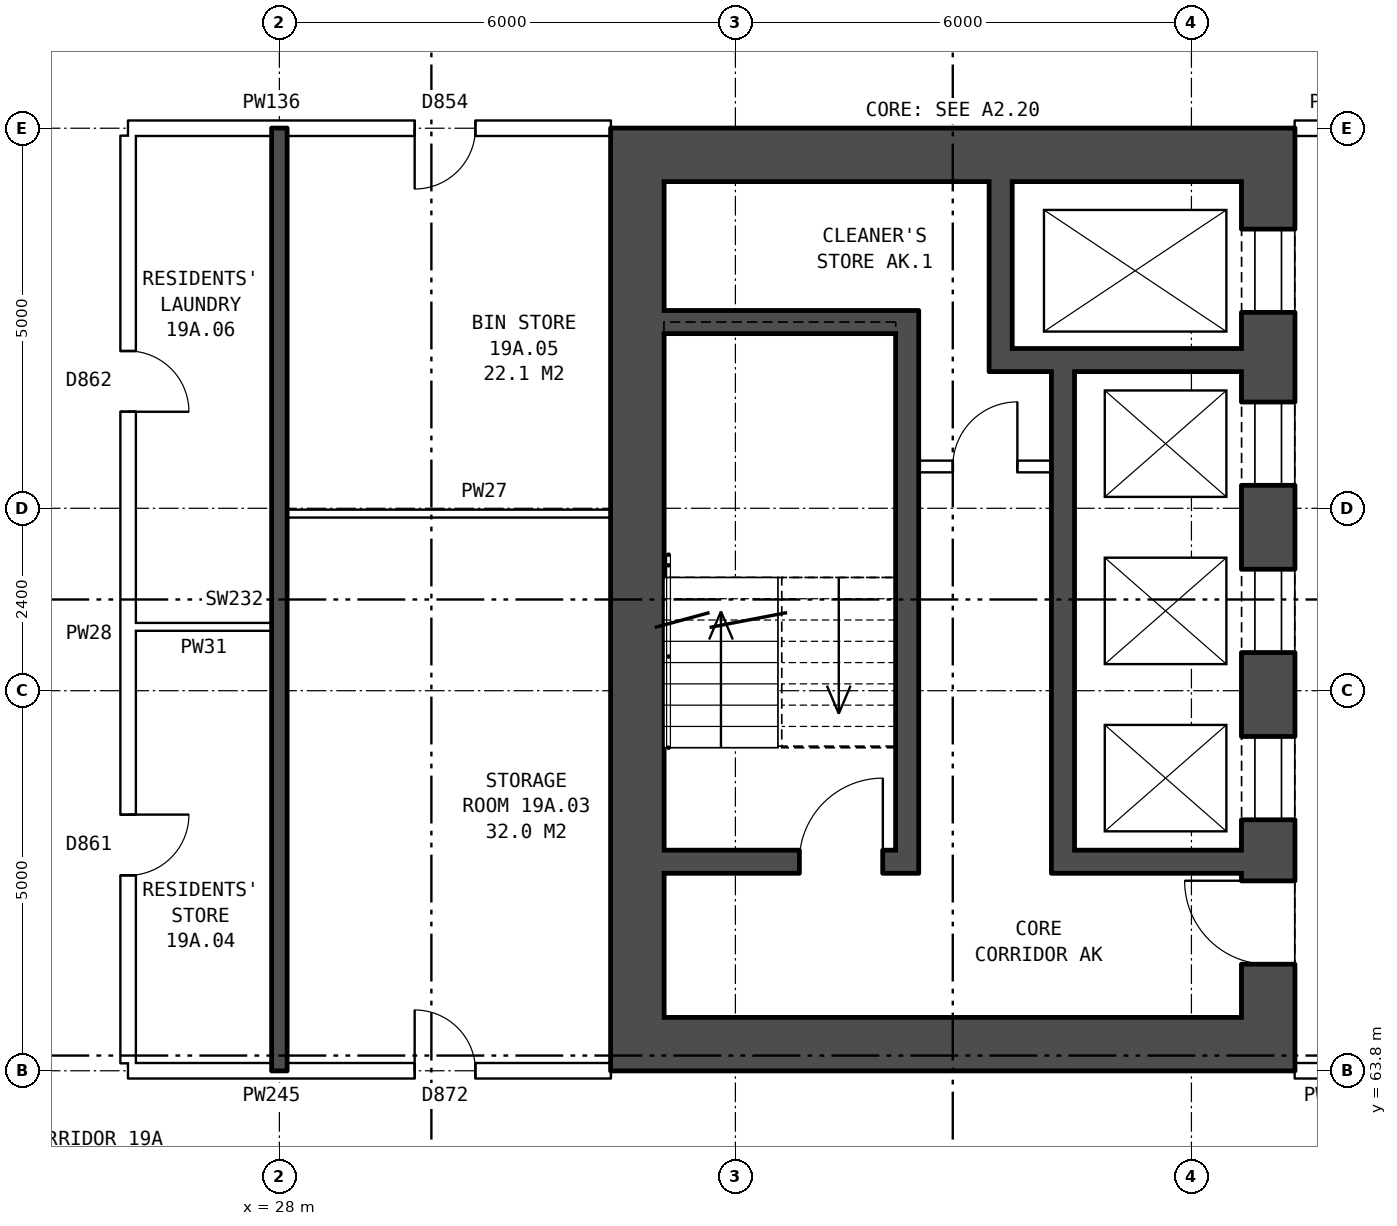
"""IFC4 building model, lengths in metres.
Left out: names, types, materials, properties, quantities, classifications, styles, units other than length and angle.
Written with IfcOpenShell. Run it as: python <this file> out.ifc"""

import sys

from ifc_helpers import new_model, si_unit, direction, frame, frame_2d, origin, place, context, subcontext, project, spatial, rectangle, extrude, element, fill, save


model = new_model("IFC4")
c1 = context("Model", 3, precision=1e-05, world=origin(), true_north=direction((0.0, 1.0)))
c2 = subcontext(c1, "Body", "Model", "MODEL_VIEW")
j1 = project(units=[si_unit("LENGTHUNIT", "METRE"), si_unit("PLANEANGLEUNIT", "RADIAN")], contexts=[c1])
p1 = place(None, origin())
s1 = spatial("IfcSite", under=j1, at=p1, CompositionType="ELEMENT")
p2 = place(p1, origin())
s2 = spatial("IfcBuilding", under=s1, at=p2, CompositionType="ELEMENT")
p3 = place(p2, frame((0.0, 0.0, 71.6)))
s3 = spatial("IfcBuildingStorey", under=s2, at=p3, CompositionType="ELEMENT", Elevation=71.6)
p4 = place(p3, frame((41.01, 75.5, 0.0), z_axis=(0.0, 0.0, 1.0), x_axis=(0.0, -1.0, 0.0)))
e1 = element("IfcWall", 1, at=p4, inside=s3, PredefinedType="SHEAR", context=c2, shape_type="SweptSolid", body=[
    extrude(rectangle(XDim=11.0, YDim=0.7, at=frame_2d((5.5, 0.0))), origin(), (0.0, 0.0, 1.0), 2.85),
])
p5 = place(p4, frame((0.625, 0.0, 0.0)))
e2 = element("IfcOpeningElement", 2, at=p5, cuts=e1, PredefinedType="OPENING", context=c2, shape_type="SweptSolid", body=[
    extrude(rectangle(XDim=1.1, YDim=2.1, at=frame_2d((0.55, 1.05))), frame((0.0, 0.36, 0.0), z_axis=(0.0, -1.0, 0.0), x_axis=(1.0, 0.0, 0.0)), (0.0, 0.0, 1.0), 0.72),
])
p6 = place(p4, frame((2.9, 0.0, 0.0)))
e3 = element("IfcOpeningElement", 3, at=p6, cuts=e1, PredefinedType="OPENING", context=c2, shape_type="SweptSolid", body=[
    extrude(rectangle(XDim=1.1, YDim=2.1, at=frame_2d((0.55, 1.05))), frame((0.0, 0.36, 0.0), z_axis=(0.0, -1.0, 0.0), x_axis=(1.0, 0.0, 0.0)), (0.0, 0.0, 1.0), 0.72),
])
p7 = place(p4, frame((5.1, 0.0, 0.0)))
e4 = element("IfcOpeningElement", 4, at=p7, cuts=e1, PredefinedType="OPENING", context=c2, shape_type="SweptSolid", body=[
    extrude(rectangle(XDim=1.1, YDim=2.1, at=frame_2d((0.55, 1.05))), frame((0.0, 0.36, 0.0), z_axis=(0.0, -1.0, 0.0), x_axis=(1.0, 0.0, 0.0)), (0.0, 0.0, 1.0), 0.72),
])
p8 = place(p4, frame((7.3, 0.0, 0.0)))
e5 = element("IfcOpeningElement", 5, at=p8, cuts=e1, PredefinedType="OPENING", context=c2, shape_type="SweptSolid", body=[
    extrude(rectangle(XDim=1.1, YDim=2.1, at=frame_2d((0.55, 1.05))), frame((0.0, 0.36, 0.0), z_axis=(0.0, -1.0, 0.0), x_axis=(1.0, 0.0, 0.0)), (0.0, 0.0, 1.0), 0.72),
])
p9 = place(p4, frame((9.2, 0.0, 0.0)))
e6 = element("IfcOpeningElement", 6, at=p9, cuts=e1, PredefinedType="OPENING", context=c2, shape_type="SweptSolid", body=[
    extrude(rectangle(XDim=1.1, YDim=2.1, at=frame_2d((0.55, 1.05))), frame((0.0, 0.36, 0.0), z_axis=(0.0, -1.0, 0.0), x_axis=(1.0, 0.0, 0.0)), (0.0, 0.0, 1.0), 0.72),
])
p10 = place(p3, frame((32.71, 75.5, 0.0), z_axis=(0.0, 0.0, 1.0), x_axis=(0.0, -1.0, 0.0)))
e7 = element("IfcWall", 7, at=p10, inside=s3, PredefinedType="SHEAR", context=c2, shape_type="SweptSolid", body=[
    extrude(rectangle(XDim=11.0, YDim=0.7, at=frame_2d((5.5, 0.0))), origin(), (0.0, 0.0, 1.0), 2.85),
])
for number, where, z_axis, x_axis in (
    (8, (41.36, 75.85, 0.0), (0.0, 0.0, 1.0), (-1.0, 0.0, 0.0)),
    (9, (41.36, 64.15, 0.0), (0.0, 0.0, 1.0), (-1.0, 0.0, 0.0)),
):
    element("IfcWall", number, at=place(p3, frame(where, z_axis=z_axis, x_axis=x_axis)), inside=s3, PredefinedType="SHEAR", context=c2, shape_type="SweptSolid", body=[
        extrude(rectangle(XDim=9.0, YDim=0.7, at=frame_2d((4.5, 0.0))), origin(), (0.0, 0.0, 1.0), 2.85),
    ])
p11 = place(p3, frame((36.11, 73.65, 0.0), z_axis=(0.0, 0.0, 1.0), x_axis=(-1.0, 0.0, 0.0)))
e10 = element("IfcWall", 10, at=p11, inside=s3, PredefinedType="SHEAR", context=c2, shape_type="SweptSolid", body=[
    extrude(rectangle(XDim=3.05, YDim=0.3, at=frame_2d((1.525, 0.0))), origin(), (0.0, 0.0, 1.0), 2.85),
])
p12 = place(p3, frame((40.66, 73.15, 0.0), z_axis=(0.0, 0.0, 1.0), x_axis=(-1.0, 0.0, 0.0)))
e11 = element("IfcWall", 11, at=p12, inside=s3, PredefinedType="SHEAR", context=c2, shape_type="SweptSolid", body=[
    extrude(rectangle(XDim=3.32, YDim=0.3, at=frame_2d((1.66, 0.0))), origin(), (0.0, 0.0, 1.0), 2.85),
])
p13 = place(p3, frame((38.16, 71.75, 0.0), z_axis=(0.0, 0.0, 1.0), x_axis=(-1.0, 0.0, 0.0)))
e12 = element("IfcWall", 12, at=p13, inside=s3, PredefinedType="PARTITIONING", context=c2, shape_type="SweptSolid", body=[
    extrude(rectangle(XDim=1.75, YDim=0.15, at=frame_2d((0.875, 0.0))), origin(), (0.0, 0.0, 1.0), 2.85),
])
p14 = place(p13, frame((0.45, 0.0, 0.0)))
e13 = element("IfcOpeningElement", 13, at=p14, cuts=e12, PredefinedType="OPENING", context=c2, shape_type="SweptSolid", body=[
    extrude(rectangle(XDim=0.85, YDim=2.1, at=frame_2d((0.425, 1.05))), frame((0.0, 0.085, 0.0), z_axis=(0.0, -1.0, 0.0), x_axis=(1.0, 0.0, 0.0)), (0.0, 0.0, 1.0), 0.17),
])
p15 = place(p3, frame((40.66, 66.55, 0.0), z_axis=(0.0, 0.0, 1.0), x_axis=(-1.0, 0.0, 0.0)))
e14 = element("IfcWall", 14, at=p15, inside=s3, PredefinedType="SHEAR", context=c2, shape_type="SweptSolid", body=[
    extrude(rectangle(XDim=2.2, YDim=0.3, at=frame_2d((1.1, 0.0))), origin(), (0.0, 0.0, 1.0), 2.85),
])
p16 = place(p3, frame((36.11, 66.55, 0.0), z_axis=(0.0, 0.0, 1.0), x_axis=(-1.0, 0.0, 0.0)))
e15 = element("IfcWall", 15, at=p16, inside=s3, PredefinedType="SHEAR", context=c2, shape_type="SweptSolid", body=[
    extrude(rectangle(XDim=3.05, YDim=0.3, at=frame_2d((1.525, 0.0))), origin(), (0.0, 0.0, 1.0), 2.85),
])
p17 = place(p16, frame((0.17, 0.0, 0.0)))
e16 = element("IfcOpeningElement", 16, at=p17, cuts=e15, PredefinedType="OPENING", context=c2, shape_type="SweptSolid", body=[
    extrude(rectangle(XDim=1.1, YDim=2.1, at=frame_2d((0.55, 1.05))), frame((0.0, 0.16, 0.0), z_axis=(0.0, -1.0, 0.0), x_axis=(1.0, 0.0, 0.0)), (0.0, 0.0, 1.0), 0.32),
])
p18 = place(p3, frame((38.31, 73.0, 0.0), z_axis=(0.0, 0.0, 1.0), x_axis=(0.0, -1.0, 0.0)))
e17 = element("IfcWall", 17, at=p18, inside=s3, PredefinedType="SHEAR", context=c2, shape_type="SweptSolid", body=[
    extrude(rectangle(XDim=6.6, YDim=0.3, at=frame_2d((3.3, 0.0))), origin(), (0.0, 0.0, 1.0), 2.85),
])
p19 = place(p3, frame((37.49, 75.5, 0.0), z_axis=(0.0, 0.0, 1.0), x_axis=(0.0, -1.0, 0.0)))
e18 = element("IfcWall", 18, at=p19, inside=s3, PredefinedType="SHEAR", context=c2, shape_type="SweptSolid", body=[
    extrude(rectangle(XDim=2.2, YDim=0.3, at=frame_2d((1.1, 0.0))), origin(), (0.0, 0.0, 1.0), 2.85),
])
p20 = place(p3, frame((36.26, 73.8, 0.0), z_axis=(0.0, 0.0, 1.0), x_axis=(0.0, -1.0, 0.0)))
e19 = element("IfcWall", 19, at=p20, inside=s3, PredefinedType="SHEAR", context=c2, shape_type="SweptSolid", body=[
    extrude(rectangle(XDim=7.4, YDim=0.3, at=frame_2d((3.7, 0.0))), origin(), (0.0, 0.0, 1.0), 2.85),
])
p21 = place(p3, frame((26.01, 63.8, 0.0), z_axis=(0.0, 0.0, 1.0), x_axis=(1.0, 0.0, 0.0)))
e20 = element("IfcWall", 20, at=p21, inside=s3, PredefinedType="PARTITIONING", context=c2, shape_type="SweptSolid", body=[
    extrude(rectangle(XDim=6.35, YDim=0.2, at=frame_2d((3.175, 0.0))), origin(), (0.0, 0.0, 1.0), 2.85),
])
p22 = place(p21, frame((3.77, 0.0, 0.0)))
e21 = element("IfcOpeningElement", 21, at=p22, cuts=e20, PredefinedType="OPENING", context=c2, shape_type="SweptSolid", body=[
    extrude(rectangle(XDim=0.8, YDim=2.1, at=frame_2d((0.4, 1.05))), frame((0.0, 0.11, 0.0), z_axis=(0.0, -1.0, 0.0), x_axis=(1.0, 0.0, 0.0)), (0.0, 0.0, 1.0), 0.22),
])
p23 = place(p3, frame((41.36, 63.8, 0.0), z_axis=(0.0, 0.0, 1.0), x_axis=(1.0, 0.0, 0.0)))
e22 = element("IfcWall", 22, at=p23, inside=s3, PredefinedType="PARTITIONING", context=c2, shape_type="SweptSolid", body=[
    extrude(rectangle(XDim=3.0, YDim=0.2, at=frame_2d((1.5, 0.0))), origin(), (0.0, 0.0, 1.0), 2.85),
])
p24 = place(p23, frame((1.0, 0.0, 0.0)))
e23 = element("IfcOpeningElement", 23, at=p24, cuts=e22, PredefinedType="OPENING", context=c2, shape_type="SweptSolid", body=[
    extrude(rectangle(XDim=1.0, YDim=2.1, at=frame_2d((0.5, 1.05))), frame((0.0, 0.11, 0.0), z_axis=(0.0, -1.0, 0.0), x_axis=(1.0, 0.0, 0.0)), (0.0, 0.0, 1.0), 0.22),
])
p25 = place(p3, frame((26.11, 69.64, 0.0), z_axis=(0.0, 0.0, 1.0), x_axis=(1.0, 0.0, 0.0)))
e24 = element("IfcWall", 24, at=p25, inside=s3, PredefinedType="PARTITIONING", context=c2, shape_type="SweptSolid", body=[
    extrude(rectangle(XDim=1.79, YDim=0.1, at=frame_2d((0.895, 0.0))), origin(), (0.0, 0.0, 1.0), 2.85),
])
p26 = place(p3, frame((28.1, 71.13, 0.0), z_axis=(0.0, 0.0, 1.0), x_axis=(1.0, 0.0, 0.0)))
e25 = element("IfcWall", 25, at=p26, inside=s3, PredefinedType="PARTITIONING", context=c2, shape_type="SweptSolid", body=[
    extrude(rectangle(XDim=4.26, YDim=0.1, at=frame_2d((2.13, 0.0))), origin(), (0.0, 0.0, 1.0), 2.85),
])
p27 = place(p3, frame((26.01, 76.2, 0.0), z_axis=(0.0, 0.0, 1.0), x_axis=(1.0, 0.0, 0.0)))
e26 = element("IfcWall", 26, at=p27, inside=s3, PredefinedType="PARTITIONING", context=c2, shape_type="SweptSolid", body=[
    extrude(rectangle(XDim=6.35, YDim=0.2, at=frame_2d((3.175, 0.0))), origin(), (0.0, 0.0, 1.0), 2.85),
])
p28 = place(p27, frame((3.77, 0.0, 0.0)))
e27 = element("IfcOpeningElement", 27, at=p28, cuts=e26, PredefinedType="OPENING", context=c2, shape_type="SweptSolid", body=[
    extrude(rectangle(XDim=0.8, YDim=2.1, at=frame_2d((0.4, 1.05))), frame((0.0, 0.11, 0.0), z_axis=(0.0, -1.0, 0.0), x_axis=(1.0, 0.0, 0.0)), (0.0, 0.0, 1.0), 0.22),
])
p29 = place(p3, frame((41.36, 76.2, 0.0), z_axis=(0.0, 0.0, 1.0), x_axis=(1.0, 0.0, 0.0)))
e28 = element("IfcWall", 28, at=p29, inside=s3, PredefinedType="PARTITIONING", context=c2, shape_type="SweptSolid", body=[
    extrude(rectangle(XDim=3.0, YDim=0.2, at=frame_2d((1.5, 0.0))), origin(), (0.0, 0.0, 1.0), 2.85),
])
p30 = place(p29, frame((1.0, 0.0, 0.0)))
e29 = element("IfcOpeningElement", 29, at=p30, cuts=e28, PredefinedType="OPENING", context=c2, shape_type="SweptSolid", body=[
    extrude(rectangle(XDim=1.0, YDim=2.1, at=frame_2d((0.5, 1.05))), frame((0.0, 0.11, 0.0), z_axis=(0.0, -1.0, 0.0), x_axis=(1.0, 0.0, 0.0)), (0.0, 0.0, 1.0), 0.22),
])
p31 = place(p3, frame((26.01, 63.9, 0.0), z_axis=(0.0, 0.0, 1.0), x_axis=(0.0, 1.0, 0.0)))
e30 = element("IfcWall", 30, at=p31, inside=s3, PredefinedType="PARTITIONING", context=c2, shape_type="SweptSolid", body=[
    extrude(rectangle(XDim=12.2, YDim=0.2, at=frame_2d((6.1, 0.0))), origin(), (0.0, 0.0, 1.0), 2.85),
])
p32 = place(p31, frame((2.47, 0.0, 0.0)))
e31 = element("IfcOpeningElement", 31, at=p32, cuts=e30, PredefinedType="OPENING", context=c2, shape_type="SweptSolid", body=[
    extrude(rectangle(XDim=0.8, YDim=2.1, at=frame_2d((0.4, 1.05))), frame((0.0, 0.11, 0.0), z_axis=(0.0, -1.0, 0.0), x_axis=(1.0, 0.0, 0.0)), (0.0, 0.0, 1.0), 0.22),
])
p33 = place(p31, frame((8.57, 0.0, 0.0)))
e32 = element("IfcOpeningElement", 32, at=p33, cuts=e30, PredefinedType="OPENING", context=c2, shape_type="SweptSolid", body=[
    extrude(rectangle(XDim=0.8, YDim=2.1, at=frame_2d((0.4, 1.05))), frame((0.0, 0.11, 0.0), z_axis=(0.0, -1.0, 0.0), x_axis=(1.0, 0.0, 0.0)), (0.0, 0.0, 1.0), 0.22),
])
p34 = place(p3, frame((28.0, 63.8, 0.0), z_axis=(0.0, 0.0, 1.0), x_axis=(0.0, 1.0, 0.0)))
e33 = element("IfcWall", 33, at=p34, inside=s3, PredefinedType="SOLIDWALL", context=c2, shape_type="SweptSolid", body=[
    extrude(rectangle(XDim=12.4, YDim=0.2, at=frame_2d((6.2, 0.0))), origin(), (0.0, 0.0, 1.0), 2.85),
])
p35 = place(p5, origin())
e34 = element("IfcDoor", 34, at=p35, inside=s3, OperationType="DOUBLE_DOOR_SLIDING", PredefinedType="DOOR", context=c2, shape_type="SweptSolid", body=[
    extrude(rectangle(XDim=1.1, YDim=2.1, at=frame_2d((0.55, 1.05))), frame((0.0, -0.285, 0.0), z_axis=(0.0, -1.0, 0.0), x_axis=(1.0, 0.0, 0.0)), (0.0, 0.0, 1.0), 0.05),
])
fill(e2, e34)
p36 = place(p6, origin())
e35 = element("IfcDoor", 35, at=p36, inside=s3, OperationType="DOUBLE_DOOR_SLIDING", PredefinedType="DOOR", context=c2, shape_type="SweptSolid", body=[
    extrude(rectangle(XDim=1.1, YDim=2.1, at=frame_2d((0.55, 1.05))), frame((0.0, -0.285, 0.0), z_axis=(0.0, -1.0, 0.0), x_axis=(1.0, 0.0, 0.0)), (0.0, 0.0, 1.0), 0.05),
])
fill(e3, e35)
p37 = place(p7, origin())
e36 = element("IfcDoor", 36, at=p37, inside=s3, OperationType="DOUBLE_DOOR_SLIDING", PredefinedType="DOOR", context=c2, shape_type="SweptSolid", body=[
    extrude(rectangle(XDim=1.1, YDim=2.1, at=frame_2d((0.55, 1.05))), frame((0.0, -0.285, 0.0), z_axis=(0.0, -1.0, 0.0), x_axis=(1.0, 0.0, 0.0)), (0.0, 0.0, 1.0), 0.05),
])
fill(e4, e36)
p38 = place(p8, origin())
e37 = element("IfcDoor", 37, at=p38, inside=s3, OperationType="DOUBLE_DOOR_SLIDING", PredefinedType="DOOR", context=c2, shape_type="SweptSolid", body=[
    extrude(rectangle(XDim=1.1, YDim=2.1, at=frame_2d((0.55, 1.05))), frame((0.0, -0.285, 0.0), z_axis=(0.0, -1.0, 0.0), x_axis=(1.0, 0.0, 0.0)), (0.0, 0.0, 1.0), 0.05),
])
fill(e5, e37)
p39 = place(p9, frame((1.1, 0.0, 0.0), z_axis=(0.0, 0.0, 1.0), x_axis=(-1.0, 0.0, 0.0)))
e38 = element("IfcDoor", 38, at=p39, inside=s3, OperationType="SINGLE_SWING_RIGHT", PredefinedType="DOOR", context=c2, shape_type="SweptSolid", body=[
    extrude(rectangle(XDim=1.1, YDim=2.1, at=frame_2d((0.55, 1.05))), frame((0.0, 0.335, 0.0), z_axis=(0.0, -1.0, 0.0), x_axis=(1.0, 0.0, 0.0)), (0.0, 0.0, 1.0), 0.05),
])
fill(e6, e38)
p40 = place(p17, frame((1.1, 0.0, 0.0), z_axis=(0.0, 0.0, 1.0), x_axis=(-1.0, 0.0, 0.0)))
e39 = element("IfcDoor", 39, at=p40, inside=s3, OperationType="SINGLE_SWING_RIGHT", PredefinedType="DOOR", context=c2, shape_type="SweptSolid", body=[
    extrude(rectangle(XDim=1.1, YDim=2.1, at=frame_2d((0.55, 1.05))), frame((0.0, 0.025, 0.0), z_axis=(0.0, -1.0, 0.0), x_axis=(1.0, 0.0, 0.0)), (0.0, 0.0, 1.0), 0.05),
])
fill(e16, e39)
p41 = place(p14, frame((0.85, 0.0, 0.0), z_axis=(0.0, 0.0, 1.0), x_axis=(-1.0, 0.0, 0.0)))
e40 = element("IfcDoor", 40, at=p41, inside=s3, OperationType="SINGLE_SWING_RIGHT", PredefinedType="DOOR", context=c2, shape_type="SweptSolid", body=[
    extrude(rectangle(XDim=0.85, YDim=2.1, at=frame_2d((0.425, 1.05))), frame((0.0, 0.025, 0.0), z_axis=(0.0, -1.0, 0.0), x_axis=(1.0, 0.0, 0.0)), (0.0, 0.0, 1.0), 0.05),
])
fill(e13, e40)
p42 = place(p22, origin())
e41 = element("IfcDoor", 41, at=p42, inside=s3, OperationType="SINGLE_SWING_LEFT", PredefinedType="DOOR", context=c2, shape_type="SweptSolid", body=[
    extrude(rectangle(XDim=0.8, YDim=2.1, at=frame_2d((0.4, 1.05))), frame((0.0, 0.025, 0.0), z_axis=(0.0, -1.0, 0.0), x_axis=(1.0, 0.0, 0.0)), (0.0, 0.0, 1.0), 0.05),
])
fill(e21, e41)
p43 = place(p32, frame((0.8, 0.0, 0.0), z_axis=(0.0, 0.0, 1.0), x_axis=(-1.0, 0.0, 0.0)))
e42 = element("IfcDoor", 42, at=p43, inside=s3, OperationType="SINGLE_SWING_LEFT", PredefinedType="DOOR", context=c2, shape_type="SweptSolid", body=[
    extrude(rectangle(XDim=0.8, YDim=2.1, at=frame_2d((0.4, 1.05))), frame((0.0, 0.025, 0.0), z_axis=(0.0, -1.0, 0.0), x_axis=(1.0, 0.0, 0.0)), (0.0, 0.0, 1.0), 0.05),
])
fill(e31, e42)
p44 = place(p28, frame((0.8, 0.0, 0.0), z_axis=(0.0, 0.0, 1.0), x_axis=(-1.0, 0.0, 0.0)))
e43 = element("IfcDoor", 43, at=p44, inside=s3, OperationType="SINGLE_SWING_RIGHT", PredefinedType="DOOR", context=c2, shape_type="SweptSolid", body=[
    extrude(rectangle(XDim=0.8, YDim=2.1, at=frame_2d((0.4, 1.05))), frame((0.0, 0.025, 0.0), z_axis=(0.0, -1.0, 0.0), x_axis=(1.0, 0.0, 0.0)), (0.0, 0.0, 1.0), 0.05),
])
fill(e27, e43)
p45 = place(p33, frame((0.8, 0.0, 0.0), z_axis=(0.0, 0.0, 1.0), x_axis=(-1.0, 0.0, 0.0)))
e44 = element("IfcDoor", 44, at=p45, inside=s3, OperationType="SINGLE_SWING_RIGHT", PredefinedType="DOOR", context=c2, shape_type="SweptSolid", body=[
    extrude(rectangle(XDim=0.8, YDim=2.1, at=frame_2d((0.4, 1.05))), frame((0.0, 0.025, 0.0), z_axis=(0.0, -1.0, 0.0), x_axis=(1.0, 0.0, 0.0)), (0.0, 0.0, 1.0), 0.05),
])
fill(e32, e44)
save(model, sys.argv[1])
